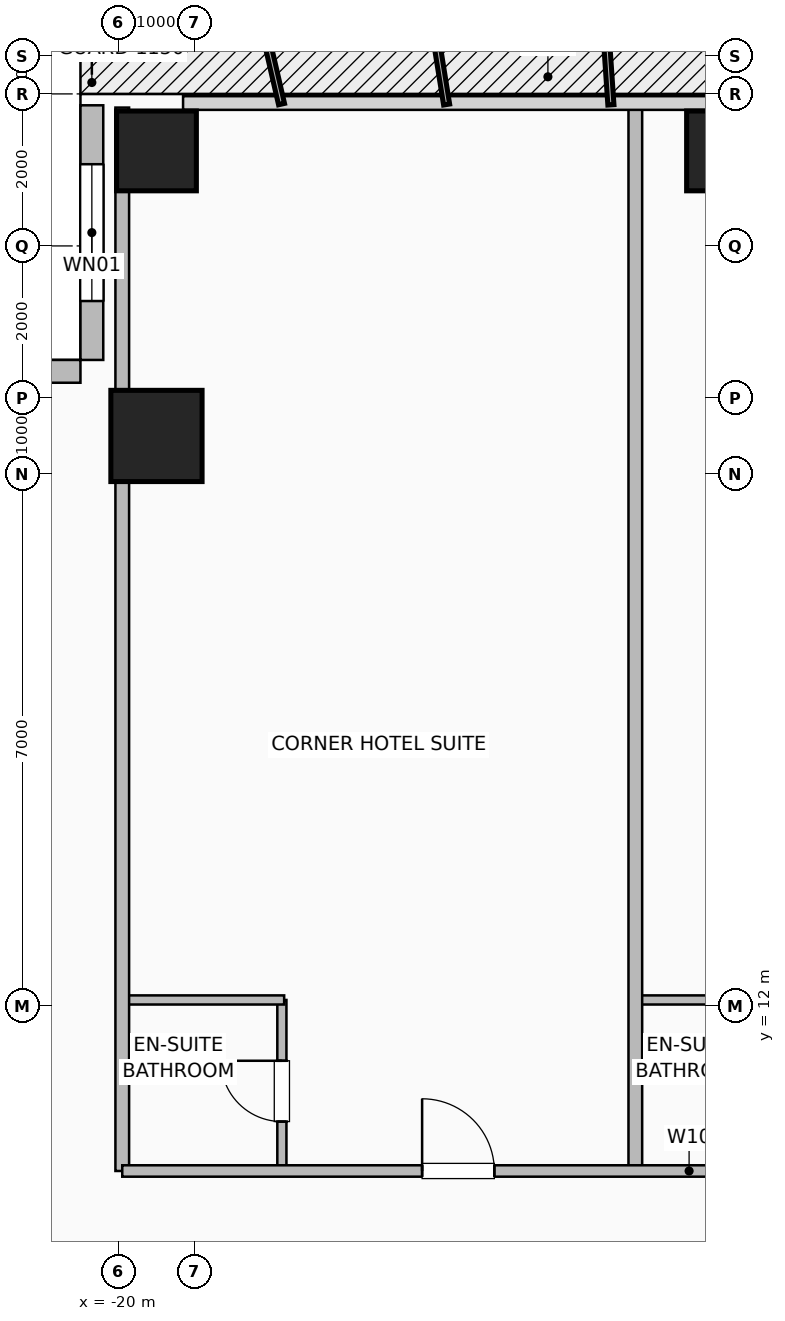
"""IFC4 building model, lengths in metres.
Left out: names, types, materials, properties, quantities, classifications, styles, units other than length and angle.
Written with IfcOpenShell. Run it as: python <this file> out.ifc"""

import sys

from ifc_helpers import new_model, si_unit, direction, frame, frame_2d, origin, origin_2d, place, context, subcontext, project, spatial, rectangle, hollow_rectangle, extrude, element, fill, save


model = new_model("IFC4")
c1 = context("Model", 3, precision=1e-05, world=origin(), true_north=direction((0.0, 1.0)))
c2 = subcontext(c1, "Body", "Model", "MODEL_VIEW")
j1 = project(units=[si_unit("LENGTHUNIT", "METRE"), si_unit("PLANEANGLEUNIT", "RADIAN")], contexts=[c1])
p1 = place(None, origin())
s1 = spatial("IfcSite", under=j1, at=p1, CompositionType="ELEMENT")
p2 = place(p1, origin())
s2 = spatial("IfcBuilding", under=s1, at=p2, CompositionType="ELEMENT")
p3 = place(p2, frame((0.0, 0.0, 27.0)))
s3 = spatial("IfcBuildingStorey", under=s2, at=p3, CompositionType="ELEMENT", Elevation=27.0)
p4 = place(p3, frame((-19.5, 23.25, 0.0), z_axis=(0.0, 0.0, 1.0), x_axis=(1.0, 0.0, 0.0)))
e1 = element("IfcColumn", 1, at=p4, inside=s3, PredefinedType="COLUMN", context=c2, shape_type="SweptSolid", body=[
    extrude(hollow_rectangle(XDim=1.05, YDim=1.05, WallThickness=0.05, at=origin_2d()), origin(), (0.0, 0.0, 1.0), 3.5),
])
p5 = place(p3, frame((-12.0, 23.25, -0.4), z_axis=(0.0, 0.0, 1.0), x_axis=(1.0, 0.0, 0.0)))
e2 = element("IfcColumn", 2, at=p5, inside=s3, PredefinedType="COLUMN", context=c2, shape_type="SweptSolid", body=[
    extrude(hollow_rectangle(XDim=1.05, YDim=1.05, WallThickness=0.05, at=origin_2d()), origin(), (0.0, 0.0, 1.0), 3.9),
])
p6 = place(p3, frame((-19.5, 19.5, 0.0), z_axis=(0.0, 0.0, 1.0), x_axis=(1.0, 0.0, 0.0)))
e3 = element("IfcColumn", 3, at=p6, inside=s3, PredefinedType="COLUMN", context=c2, shape_type="SweptSolid", body=[
    extrude(hollow_rectangle(XDim=1.2, YDim=1.2, WallThickness=0.055, at=origin_2d()), origin(), (0.0, 0.0, 1.0), 3.5),
])
p7 = place(p3, frame((-20.35, 23.85, 0.0), z_axis=(0.0, 0.0, 1.0), x_axis=(0.0, -1.0, 0.0)))
e4 = element("IfcWall", 4, at=p7, inside=s3, PredefinedType="SOLIDWALL", context=c2, shape_type="SweptSolid", body=[
    extrude(rectangle(XDim=3.35, YDim=0.3, at=frame_2d((1.675, 0.0))), origin(), (0.0, 0.0, 1.0), 3.25),
])
p8 = place(p7, frame((0.775, 0.0, 0.9)))
e5 = element("IfcOpeningElement", 5, at=p8, cuts=e4, PredefinedType="OPENING", context=c2, shape_type="SweptSolid", body=[
    extrude(rectangle(XDim=1.8, YDim=1.8, at=frame_2d((0.9, 0.9))), frame((0.0, 0.16, 0.0), z_axis=(0.0, -1.0, 0.0), x_axis=(1.0, 0.0, 0.0)), (0.0, 0.0, 1.0), 0.32),
])
p9 = place(p3, frame((-23.85, 20.35, 0.0), z_axis=(0.0, 0.0, 1.0), x_axis=(1.0, 0.0, 0.0)))
e6 = element("IfcWall", 6, at=p9, inside=s3, PredefinedType="SOLIDWALL", context=c2, shape_type="SweptSolid", body=[
    extrude(rectangle(XDim=3.35, YDim=0.3, at=frame_2d((1.675, 0.0))), origin(), (0.0, 0.0, 1.0), 3.25),
])
p10 = place(p3, frame((-17.85, 9.83, 0.0), z_axis=(0.0, 0.0, 1.0), x_axis=(0.0, 1.0, 0.0)))
e7 = element("IfcWall", 7, at=p10, inside=s3, PredefinedType="PLUMBINGWALL", context=c2, shape_type="SweptSolid", body=[
    extrude(rectangle(XDim=2.25, YDim=0.12, at=frame_2d((1.125, 0.0))), origin(), (0.0, 0.0, 1.0), 3.25),
])
p11 = place(p10, frame((0.65, 0.0, 0.0)))
e8 = element("IfcOpeningElement", 8, at=p11, cuts=e7, PredefinedType="OPENING", context=c2, shape_type="SweptSolid", body=[
    extrude(rectangle(XDim=0.8, YDim=2.05, at=frame_2d((0.4, 1.025))), frame((0.0, 0.07, 0.0), z_axis=(0.0, -1.0, 0.0), x_axis=(1.0, 0.0, 0.0)), (0.0, 0.0, 1.0), 0.14),
])
for number, where, z_axis, x_axis in (
    (9, (-19.92, 12.08, 0.0), (0.0, 0.0, 1.0), (1.0, 0.0, 0.0)),
    (10, (-13.17, 12.08, 0.0), (0.0, 0.0, 1.0), (1.0, 0.0, 0.0)),
):
    element("IfcWall", number, at=place(p3, frame(where, z_axis=z_axis, x_axis=x_axis)), inside=s3, PredefinedType="PLUMBINGWALL", context=c2, shape_type="SweptSolid", body=[
        extrude(rectangle(XDim=2.1, YDim=0.12, at=frame_2d((1.05, 0.0))), origin(), (0.0, 0.0, 1.0), 3.25),
    ])
for number, where, z_axis, x_axis in (
    (11, (-19.95, 9.83, 0.0), (0.0, 0.0, 1.0), (0.0, 1.0, 0.0)),
    (12, (-13.2, 9.83, 0.0), (0.0, 0.0, 1.0), (0.0, 1.0, 0.0)),
):
    element("IfcWall", number, at=place(p3, frame(where, z_axis=z_axis, x_axis=x_axis)), inside=s3, PredefinedType="PARTITIONING", context=c2, shape_type="SweptSolid", body=[
        extrude(rectangle(XDim=13.99, YDim=0.18, at=frame_2d((6.995, 0.0))), origin(), (0.0, 0.0, 1.0), 3.25),
    ])
p12 = place(p3, frame((-19.95, 9.83, 0.0), z_axis=(0.0, 0.0, 1.0), x_axis=(1.0, 0.0, 0.0)))
e13 = element("IfcWall", 13, at=p12, inside=s3, PredefinedType="PARTITIONING", context=c2, shape_type="SweptSolid", body=[
    extrude(rectangle(XDim=39.9, YDim=0.15, at=frame_2d((19.95, 0.0))), origin(), (0.0, 0.0, 1.0), 3.25),
])
p13 = place(p12, frame((3.945, 0.0, 0.0)))
e14 = element("IfcOpeningElement", 14, at=p13, cuts=e13, PredefinedType="OPENING", context=c2, shape_type="SweptSolid", body=[
    extrude(rectangle(XDim=0.95, YDim=2.08, at=frame_2d((0.475, 1.04))), frame((0.0, 0.085, 0.0), z_axis=(0.0, -1.0, 0.0), x_axis=(1.0, 0.0, 0.0)), (0.0, 0.0, 1.0), 0.17),
])
p14 = place(p12, frame((10.02, 0.0, 0.0)))
e15 = element("IfcOpeningElement", 15, at=p14, cuts=e13, PredefinedType="OPENING", context=c2, shape_type="SweptSolid", body=[
    extrude(rectangle(XDim=0.95, YDim=2.08, at=frame_2d((0.475, 1.04))), frame((0.0, 0.085, 0.0), z_axis=(0.0, -1.0, 0.0), x_axis=(1.0, 0.0, 0.0)), (0.0, 0.0, 1.0), 0.17),
])
p15 = place(p12, frame((15.42, 0.0, 0.0)))
e16 = element("IfcOpeningElement", 16, at=p15, cuts=e13, PredefinedType="OPENING", context=c2, shape_type="SweptSolid", body=[
    extrude(rectangle(XDim=0.95, YDim=2.08, at=frame_2d((0.475, 1.04))), frame((0.0, 0.085, 0.0), z_axis=(0.0, -1.0, 0.0), x_axis=(1.0, 0.0, 0.0)), (0.0, 0.0, 1.0), 0.17),
])
p16 = place(p12, frame((20.702, 0.0, 0.0)))
e17 = element("IfcOpeningElement", 17, at=p16, cuts=e13, PredefinedType="OPENING", context=c2, shape_type="SweptSolid", body=[
    extrude(rectangle(XDim=0.95, YDim=2.08, at=frame_2d((0.475, 1.04))), frame((0.0, 0.085, 0.0), z_axis=(0.0, -1.0, 0.0), x_axis=(1.0, 0.0, 0.0)), (0.0, 0.0, 1.0), 0.17),
])
p17 = place(p12, frame((26.02, 0.0, 0.0)))
e18 = element("IfcOpeningElement", 18, at=p17, cuts=e13, PredefinedType="OPENING", context=c2, shape_type="SweptSolid", body=[
    extrude(rectangle(XDim=0.95, YDim=2.08, at=frame_2d((0.475, 1.04))), frame((0.0, 0.085, 0.0), z_axis=(0.0, -1.0, 0.0), x_axis=(1.0, 0.0, 0.0)), (0.0, 0.0, 1.0), 0.17),
])
p18 = place(p12, frame((31.37, 0.0, 0.0)))
e19 = element("IfcOpeningElement", 19, at=p18, cuts=e13, PredefinedType="OPENING", context=c2, shape_type="SweptSolid", body=[
    extrude(rectangle(XDim=0.95, YDim=2.08, at=frame_2d((0.475, 1.04))), frame((0.0, 0.085, 0.0), z_axis=(0.0, -1.0, 0.0), x_axis=(1.0, 0.0, 0.0)), (0.0, 0.0, 1.0), 0.17),
])
p19 = place(p12, frame((37.245, 0.0, 0.0)))
e20 = element("IfcOpeningElement", 20, at=p19, cuts=e13, PredefinedType="OPENING", context=c2, shape_type="SweptSolid", body=[
    extrude(rectangle(XDim=0.95, YDim=2.08, at=frame_2d((0.475, 1.04))), frame((0.0, 0.085, 0.0), z_axis=(0.0, -1.0, 0.0), x_axis=(1.0, 0.0, 0.0)), (0.0, 0.0, 1.0), 0.17),
])
p20 = place(p8, origin())
e21 = element("IfcWindow", 21, at=p20, inside=s3, PartitioningType="SINGLE_PANEL", PredefinedType="WINDOW", context=c2, shape_type="SweptSolid", body=[
    extrude(rectangle(XDim=1.8, YDim=1.8, at=frame_2d((0.9, 0.9))), frame((0.0, 0.03, 0.0), z_axis=(0.0, -1.0, 0.0), x_axis=(1.0, 0.0, 0.0)), (0.0, 0.0, 1.0), 0.06),
])
fill(e5, e21)
p21 = place(p11, origin())
e22 = element("IfcDoor", 22, at=p21, inside=s3, OperationType="SINGLE_SWING_RIGHT", PredefinedType="DOOR", context=c2, shape_type="SweptSolid", body=[
    extrude(rectangle(XDim=0.8, YDim=2.05, at=frame_2d((0.4, 1.025))), frame((0.0, 0.025, 0.0), z_axis=(0.0, -1.0, 0.0), x_axis=(1.0, 0.0, 0.0)), (0.0, 0.0, 1.0), 0.05),
])
fill(e8, e22)
p22 = place(p13, origin())
e23 = element("IfcDoor", 23, at=p22, inside=s3, OperationType="SINGLE_SWING_LEFT", PredefinedType="DOOR", context=c2, shape_type="SweptSolid", body=[
    extrude(rectangle(XDim=0.95, YDim=2.08, at=frame_2d((0.475, 1.04))), frame((0.0, 0.025, 0.0), z_axis=(0.0, -1.0, 0.0), x_axis=(1.0, 0.0, 0.0)), (0.0, 0.0, 1.0), 0.05),
])
fill(e14, e23)
save(model, sys.argv[1])
